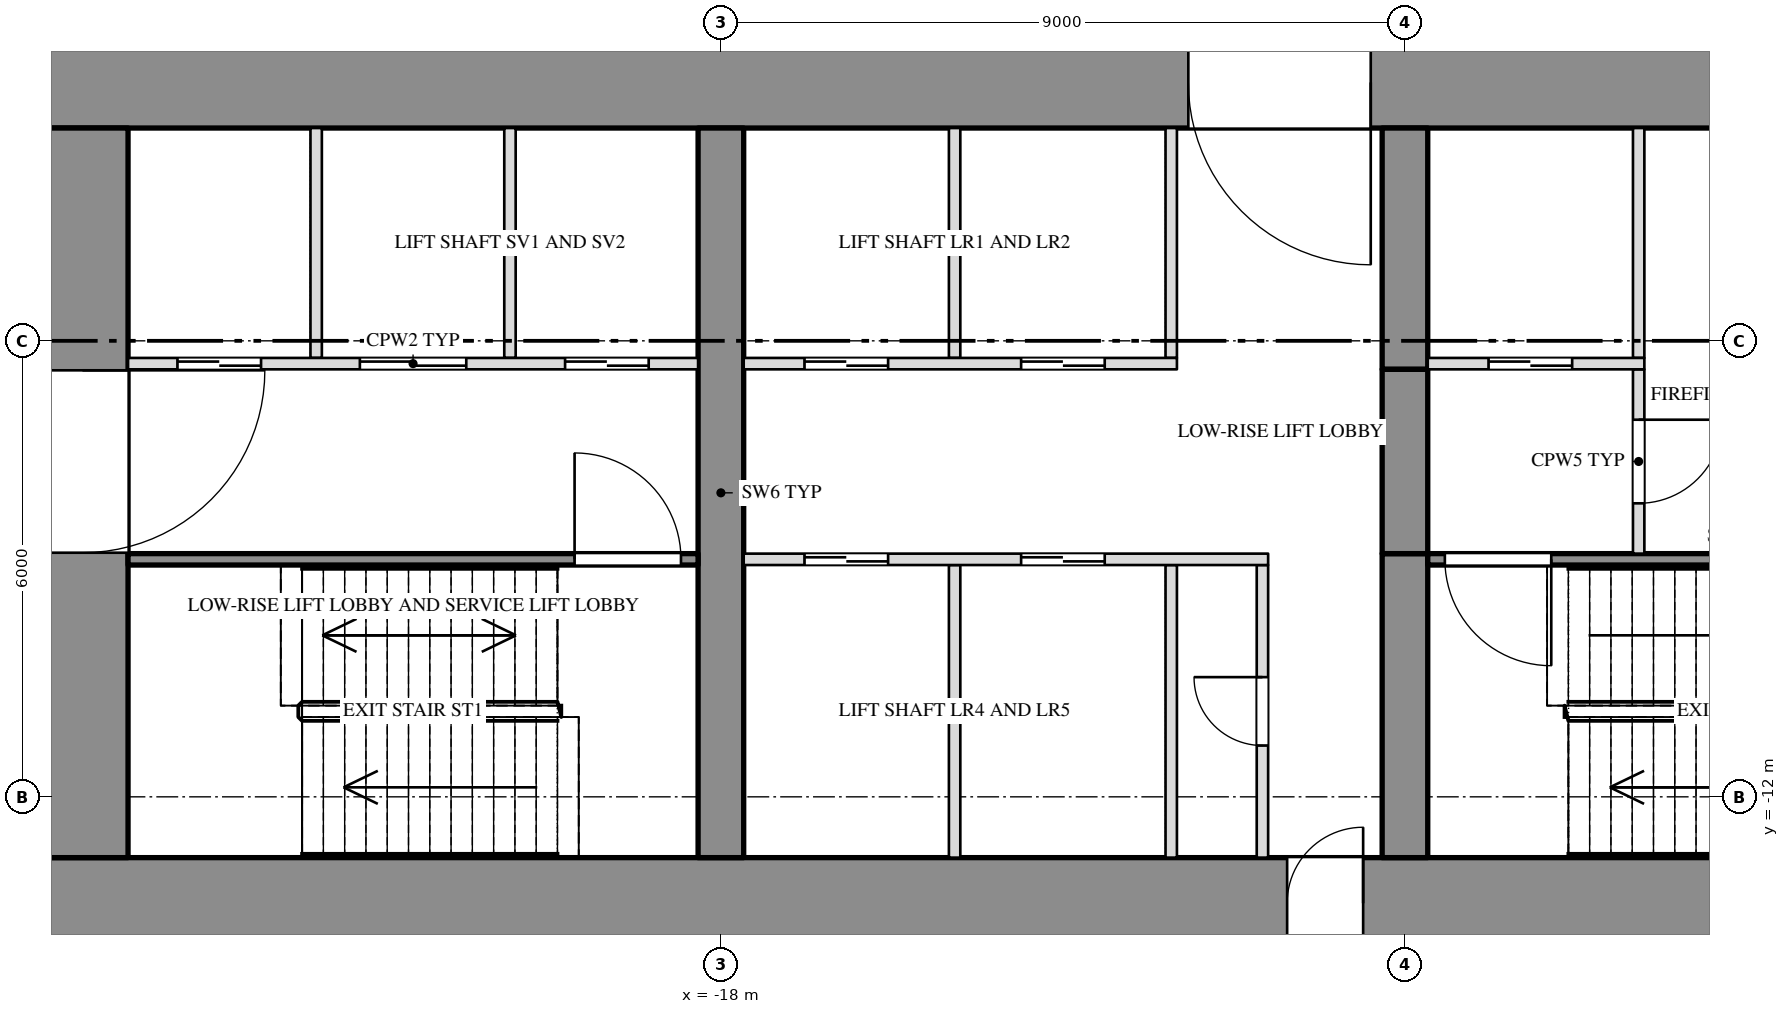
"""IFC4 building model, lengths in metres.
Left out: names, types, materials, properties, quantities, classifications, styles, units other than length and angle.
Written with IfcOpenShell. Run it as: python <this file> out.ifc"""

import sys

from ifc_helpers import new_model, si_unit, direction, frame, frame_2d, origin, place, context, subcontext, project, spatial, rectangle, extrude, element, fill, save


model = new_model("IFC4")
c1 = context("Model", 3, precision=1e-05, world=origin(), true_north=direction((0.0, 1.0)))
c2 = subcontext(c1, "Body", "Model", "MODEL_VIEW")
j1 = project(units=[si_unit("LENGTHUNIT", "METRE"), si_unit("PLANEANGLEUNIT", "RADIAN")], contexts=[c1])
p1 = place(None, origin())
s1 = spatial("IfcSite", under=j1, at=p1, CompositionType="ELEMENT")
p2 = place(p1, origin())
s2 = spatial("IfcBuilding", under=s1, at=p2, CompositionType="ELEMENT")
p3 = place(p2, frame((0.0, 0.0, 43.5)))
s3 = spatial("IfcBuildingStorey", under=s2, at=p3, CompositionType="ELEMENT", Elevation=43.5)
p4 = place(p3, frame((-27.0, -2.6, 0.0), z_axis=(0.0, 0.0, 1.0), x_axis=(1.0, 0.0, 0.0)))
e1 = element("IfcWall", 1, at=p4, inside=s3, PredefinedType="SHEAR", context=c2, shape_type="SweptSolid", body=[
    extrude(rectangle(XDim=54.0, YDim=1.2, at=frame_2d((27.0, 0.0))), origin(), (0.0, 0.0, 1.0), 4.25),
])
p5 = place(p4, frame((15.15, 0.0, 0.0)))
e2 = element("IfcOpeningElement", 2, at=p5, cuts=e1, PredefinedType="OPENING", context=c2, shape_type="SweptSolid", body=[
    extrude(rectangle(XDim=2.4, YDim=2.1, at=frame_2d((1.2, 1.05))), frame((0.0, 0.612, 0.0), z_axis=(0.0, -1.0, 0.0), x_axis=(1.0, 0.0, 0.0)), (0.0, 0.0, 1.0), 1.224),
])
p6 = place(p4, frame((36.45, 0.0, 0.0)))
e3 = element("IfcOpeningElement", 3, at=p6, cuts=e1, PredefinedType="OPENING", context=c2, shape_type="SweptSolid", body=[
    extrude(rectangle(XDim=2.4, YDim=2.1, at=frame_2d((1.2, 1.05))), frame((0.0, 0.612, 0.0), z_axis=(0.0, -1.0, 0.0), x_axis=(1.0, 0.0, 0.0)), (0.0, 0.0, 1.0), 1.224),
])
p7 = place(p3, frame((-27.0, -13.4, 0.0), z_axis=(0.0, 0.0, 1.0), x_axis=(1.0, 0.0, 0.0)))
e4 = element("IfcWall", 4, at=p7, inside=s3, PredefinedType="SHEAR", context=c2, shape_type="SweptSolid", body=[
    extrude(rectangle(XDim=54.0, YDim=1.2, at=frame_2d((27.0, 0.0))), origin(), (0.0, 0.0, 1.0), 4.25),
])
p8 = place(p7, frame((16.45, 0.0, 0.0)))
e5 = element("IfcOpeningElement", 5, at=p8, cuts=e4, PredefinedType="OPENING", context=c2, shape_type="SweptSolid", body=[
    extrude(rectangle(XDim=1.0, YDim=2.1, at=frame_2d((0.5, 1.05))), frame((0.0, 0.612, 0.0), z_axis=(0.0, -1.0, 0.0), x_axis=(1.0, 0.0, 0.0)), (0.0, 0.0, 1.0), 1.224),
])
p9 = place(p7, frame((36.55, 0.0, 0.0)))
e6 = element("IfcOpeningElement", 6, at=p9, cuts=e4, PredefinedType="OPENING", context=c2, shape_type="SweptSolid", body=[
    extrude(rectangle(XDim=1.0, YDim=2.1, at=frame_2d((0.5, 1.05))), frame((0.0, 0.612, 0.0), z_axis=(0.0, -1.0, 0.0), x_axis=(1.0, 0.0, 0.0)), (0.0, 0.0, 1.0), 1.224),
])
p10 = place(p3, frame((-26.4, -12.8, 0.0), z_axis=(0.0, 0.0, 1.0), x_axis=(0.0, 1.0, 0.0)))
e7 = element("IfcWall", 7, at=p10, inside=s3, PredefinedType="SHEAR", context=c2, shape_type="SweptSolid", body=[
    extrude(rectangle(XDim=9.6, YDim=1.2, at=frame_2d((4.8, 0.0))), origin(), (0.0, 0.0, 1.0), 4.25),
])
p11 = place(p10, frame((4.012, 0.0, 0.0)))
e8 = element("IfcOpeningElement", 8, at=p11, cuts=e7, PredefinedType="OPENING", context=c2, shape_type="SweptSolid", body=[
    extrude(rectangle(XDim=2.4, YDim=2.1, at=frame_2d((1.2, 1.05))), frame((0.0, 0.612, 0.0), z_axis=(0.0, -1.0, 0.0), x_axis=(1.0, 0.0, 0.0)), (0.0, 0.0, 1.0), 1.224),
])
p12 = place(p3, frame((-18.0, -12.8, 0.0), z_axis=(0.0, 0.0, 1.0), x_axis=(0.0, 1.0, 0.0)))
e9 = element("IfcWall", 9, at=p12, inside=s3, PredefinedType="SHEAR", context=c2, shape_type="SweptSolid", body=[
    extrude(rectangle(XDim=9.6, YDim=0.6, at=frame_2d((4.8, 0.0))), origin(), (0.0, 0.0, 1.0), 4.25),
])
p13 = place(p3, frame((-9.0, -12.8, 0.0), z_axis=(0.0, 0.0, 1.0), x_axis=(0.0, 1.0, 0.0)))
e10 = element("IfcWall", 10, at=p13, inside=s3, PredefinedType="SHEAR", context=c2, shape_type="SweptSolid", body=[
    extrude(rectangle(XDim=4.0, YDim=0.6, at=frame_2d((2.0, 0.0))), origin(), (0.0, 0.0, 1.0), 4.25),
])
p14 = place(p3, frame((-9.0, -6.375, 0.0), z_axis=(0.0, 0.0, 1.0), x_axis=(0.0, 1.0, 0.0)))
e11 = element("IfcWall", 11, at=p14, inside=s3, PredefinedType="SHEAR", context=c2, shape_type="SweptSolid", body=[
    extrude(rectangle(XDim=3.175, YDim=0.6, at=frame_2d((1.587, 0.0))), origin(), (0.0, 0.0, 1.0), 4.25),
])
p15 = place(p3, frame((-9.0, -8.8, 3.6), z_axis=(0.0, 0.0, 1.0), x_axis=(0.0, 1.0, 0.0)))
e12 = element("IfcWall", 12, at=p15, inside=s3, PredefinedType="SHEAR", context=c2, shape_type="SweptSolid", body=[
    extrude(rectangle(XDim=2.425, YDim=0.6, at=frame_2d((1.212, 0.0))), origin(), (0.0, 0.0, 1.0), 0.65),
])
for number, where, z_axis, x_axis in (
    (13, (-20.775, -6.225, 0.0), (0.0, 0.0, 1.0), (0.0, 1.0, 0.0)),
    (14, (-23.325, -6.225, 0.0), (0.0, 0.0, 1.0), (0.0, 1.0, 0.0)),
    (15, (-12.075, -6.225, 0.0), (0.0, 0.0, 1.0), (0.0, 1.0, 0.0)),
    (16, (-14.925, -6.225, 0.0), (0.0, 0.0, 1.0), (0.0, 1.0, 0.0)),
    (17, (-5.925, -6.225, 0.0), (0.0, 0.0, 1.0), (0.0, 1.0, 0.0)),
):
    element("IfcWall", number, at=place(p3, frame(where, z_axis=z_axis, x_axis=x_axis)), inside=s3, PredefinedType="PARTITIONING", context=c2, shape_type="SweptSolid", body=[
        extrude(rectangle(XDim=3.025, YDim=0.15, at=frame_2d((1.513, 0.0))), origin(), (0.0, 0.0, 1.0), 4.25),
    ])
p16 = place(p3, frame((-10.875, -12.8, 0.0), z_axis=(0.0, 0.0, 1.0), x_axis=(0.0, 1.0, 0.0)))
e18 = element("IfcWall", 18, at=p16, inside=s3, PredefinedType="PARTITIONING", context=c2, shape_type="SweptSolid", body=[
    extrude(rectangle(XDim=3.85, YDim=0.15, at=frame_2d((1.925, 0.0))), origin(), (0.0, 0.0, 1.0), 4.25),
])
p17 = place(p16, frame((1.475, 0.0, 0.0)))
e19 = element("IfcOpeningElement", 19, at=p17, cuts=e18, PredefinedType="OPENING", context=c2, shape_type="SweptSolid", body=[
    extrude(rectangle(XDim=0.9, YDim=2.1, at=frame_2d((0.45, 1.05))), frame((0.0, 0.087, 0.0), z_axis=(0.0, -1.0, 0.0), x_axis=(1.0, 0.0, 0.0)), (0.0, 0.0, 1.0), 0.174),
])
for number, where, z_axis, x_axis in (
    (20, (-12.075, -12.8, 0.0), (0.0, 0.0, 1.0), (0.0, 1.0, 0.0)),
    (21, (-14.925, -12.8, 0.0), (0.0, 0.0, 1.0), (0.0, 1.0, 0.0)),
):
    element("IfcWall", number, at=place(p3, frame(where, z_axis=z_axis, x_axis=x_axis)), inside=s3, PredefinedType="PARTITIONING", context=c2, shape_type="SweptSolid", body=[
        extrude(rectangle(XDim=3.85, YDim=0.15, at=frame_2d((1.925, 0.0))), origin(), (0.0, 0.0, 1.0), 4.25),
    ])
p18 = place(p3, frame((-5.925, -8.8, 0.0), z_axis=(0.0, 0.0, 1.0), x_axis=(0.0, 1.0, 0.0)))
e22 = element("IfcWall", 22, at=p18, inside=s3, PredefinedType="PARTITIONING", context=c2, shape_type="SweptSolid", body=[
    extrude(rectangle(XDim=2.425, YDim=0.15, at=frame_2d((1.212, 0.0))), origin(), (0.0, 0.0, 1.0), 4.25),
])
p19 = place(p18, frame((0.662, 0.0, 0.0)))
e23 = element("IfcOpeningElement", 23, at=p19, cuts=e22, PredefinedType="OPENING", context=c2, shape_type="SweptSolid", body=[
    extrude(rectangle(XDim=1.1, YDim=2.1, at=frame_2d((0.55, 1.05))), frame((0.0, 0.087, 0.0), z_axis=(0.0, -1.0, 0.0), x_axis=(1.0, 0.0, 0.0)), (0.0, 0.0, 1.0), 0.174),
])
p20 = place(p3, frame((-25.8, -6.3, 0.0), z_axis=(0.0, 0.0, 1.0), x_axis=(1.0, 0.0, 0.0)))
e24 = element("IfcWall", 24, at=p20, inside=s3, PredefinedType="PARTITIONING", context=c2, shape_type="SweptSolid", body=[
    extrude(rectangle(XDim=7.5, YDim=0.15, at=frame_2d((3.75, 0.0))), origin(), (0.0, 0.0, 1.0), 4.25),
])
p21 = place(p20, frame((0.65, 0.0, 0.0)))
e25 = element("IfcOpeningElement", 25, at=p21, cuts=e24, PredefinedType="OPENING", context=c2, shape_type="SweptSolid", body=[
    extrude(rectangle(XDim=1.1, YDim=2.1, at=frame_2d((0.55, 1.05))), frame((0.0, 0.087, 0.0), z_axis=(0.0, -1.0, 0.0), x_axis=(1.0, 0.0, 0.0)), (0.0, 0.0, 1.0), 0.174),
])
p22 = place(p20, frame((3.05, 0.0, 0.0)))
e26 = element("IfcOpeningElement", 26, at=p22, cuts=e24, PredefinedType="OPENING", context=c2, shape_type="SweptSolid", body=[
    extrude(rectangle(XDim=1.4, YDim=2.1, at=frame_2d((0.7, 1.05))), frame((0.0, 0.087, 0.0), z_axis=(0.0, -1.0, 0.0), x_axis=(1.0, 0.0, 0.0)), (0.0, 0.0, 1.0), 0.174),
])
p23 = place(p20, frame((5.75, 0.0, 0.0)))
e27 = element("IfcOpeningElement", 27, at=p23, cuts=e24, PredefinedType="OPENING", context=c2, shape_type="SweptSolid", body=[
    extrude(rectangle(XDim=1.1, YDim=2.1, at=frame_2d((0.55, 1.05))), frame((0.0, 0.087, 0.0), z_axis=(0.0, -1.0, 0.0), x_axis=(1.0, 0.0, 0.0)), (0.0, 0.0, 1.0), 0.174),
])
p24 = place(p3, frame((-17.7, -6.3, 0.0), z_axis=(0.0, 0.0, 1.0), x_axis=(1.0, 0.0, 0.0)))
e28 = element("IfcWall", 28, at=p24, inside=s3, PredefinedType="PARTITIONING", context=c2, shape_type="SweptSolid", body=[
    extrude(rectangle(XDim=5.7, YDim=0.15, at=frame_2d((2.85, 0.0))), origin(), (0.0, 0.0, 1.0), 4.25),
])
p25 = place(p24, frame((0.8, 0.0, 0.0)))
e29 = element("IfcOpeningElement", 29, at=p25, cuts=e28, PredefinedType="OPENING", context=c2, shape_type="SweptSolid", body=[
    extrude(rectangle(XDim=1.1, YDim=2.1, at=frame_2d((0.55, 1.05))), frame((0.0, 0.087, 0.0), z_axis=(0.0, -1.0, 0.0), x_axis=(1.0, 0.0, 0.0)), (0.0, 0.0, 1.0), 0.174),
])
p26 = place(p24, frame((3.65, 0.0, 0.0)))
e30 = element("IfcOpeningElement", 30, at=p26, cuts=e28, PredefinedType="OPENING", context=c2, shape_type="SweptSolid", body=[
    extrude(rectangle(XDim=1.1, YDim=2.1, at=frame_2d((0.55, 1.05))), frame((0.0, 0.087, 0.0), z_axis=(0.0, -1.0, 0.0), x_axis=(1.0, 0.0, 0.0)), (0.0, 0.0, 1.0), 0.174),
])
p27 = place(p3, frame((-8.7, -6.3, 0.0), z_axis=(0.0, 0.0, 1.0), x_axis=(1.0, 0.0, 0.0)))
e31 = element("IfcWall", 31, at=p27, inside=s3, PredefinedType="PARTITIONING", context=c2, shape_type="SweptSolid", body=[
    extrude(rectangle(XDim=2.85, YDim=0.15, at=frame_2d((1.425, 0.0))), origin(), (0.0, 0.0, 1.0), 4.25),
])
p28 = place(p27, frame((0.8, 0.0, 0.0)))
e32 = element("IfcOpeningElement", 32, at=p28, cuts=e31, PredefinedType="OPENING", context=c2, shape_type="SweptSolid", body=[
    extrude(rectangle(XDim=1.1, YDim=2.1, at=frame_2d((0.55, 1.05))), frame((0.0, 0.087, 0.0), z_axis=(0.0, -1.0, 0.0), x_axis=(1.0, 0.0, 0.0)), (0.0, 0.0, 1.0), 0.174),
])
p29 = place(p3, frame((-25.8, -8.875, 0.0), z_axis=(0.0, 0.0, 1.0), x_axis=(1.0, 0.0, 0.0)))
e33 = element("IfcWall", 33, at=p29, inside=s3, PredefinedType="SHEAR", context=c2, shape_type="SweptSolid", body=[
    extrude(rectangle(XDim=7.5, YDim=0.15, at=frame_2d((3.75, 0.0))), origin(), (0.0, 0.0, 1.0), 4.25),
])
p30 = place(p29, frame((5.875, 0.0, 0.0)))
e34 = element("IfcOpeningElement", 34, at=p30, cuts=e33, PredefinedType="OPENING", context=c2, shape_type="SweptSolid", body=[
    extrude(rectangle(XDim=1.4, YDim=2.1, at=frame_2d((0.7, 1.05))), frame((0.0, 0.087, 0.0), z_axis=(0.0, -1.0, 0.0), x_axis=(1.0, 0.0, 0.0)), (0.0, 0.0, 1.0), 0.174),
])
p31 = place(p3, frame((-17.7, -8.875, 0.0), z_axis=(0.0, 0.0, 1.0), x_axis=(1.0, 0.0, 0.0)))
e35 = element("IfcWall", 35, at=p31, inside=s3, PredefinedType="PARTITIONING", context=c2, shape_type="SweptSolid", body=[
    extrude(rectangle(XDim=6.9, YDim=0.15, at=frame_2d((3.45, 0.0))), origin(), (0.0, 0.0, 1.0), 4.25),
])
p32 = place(p31, frame((0.8, 0.0, 0.0)))
e36 = element("IfcOpeningElement", 36, at=p32, cuts=e35, PredefinedType="OPENING", context=c2, shape_type="SweptSolid", body=[
    extrude(rectangle(XDim=1.1, YDim=2.1, at=frame_2d((0.55, 1.05))), frame((0.0, 0.087, 0.0), z_axis=(0.0, -1.0, 0.0), x_axis=(1.0, 0.0, 0.0)), (0.0, 0.0, 1.0), 0.174),
])
p33 = place(p31, frame((3.65, 0.0, 0.0)))
e37 = element("IfcOpeningElement", 37, at=p33, cuts=e35, PredefinedType="OPENING", context=c2, shape_type="SweptSolid", body=[
    extrude(rectangle(XDim=1.1, YDim=2.1, at=frame_2d((0.55, 1.05))), frame((0.0, 0.087, 0.0), z_axis=(0.0, -1.0, 0.0), x_axis=(1.0, 0.0, 0.0)), (0.0, 0.0, 1.0), 0.174),
])
p34 = place(p3, frame((-8.7, -8.875, 0.0), z_axis=(0.0, 0.0, 1.0), x_axis=(1.0, 0.0, 0.0)))
e38 = element("IfcWall", 38, at=p34, inside=s3, PredefinedType="SHEAR", context=c2, shape_type="SweptSolid", body=[
    extrude(rectangle(XDim=8.4, YDim=0.15, at=frame_2d((4.2, 0.0))), origin(), (0.0, 0.0, 1.0), 4.25),
])
p35 = place(p34, frame((0.225, 0.0, 0.0)))
e39 = element("IfcOpeningElement", 39, at=p35, cuts=e38, PredefinedType="OPENING", context=c2, shape_type="SweptSolid", body=[
    extrude(rectangle(XDim=1.4, YDim=2.1, at=frame_2d((0.7, 1.05))), frame((0.0, 0.087, 0.0), z_axis=(0.0, -1.0, 0.0), x_axis=(1.0, 0.0, 0.0)), (0.0, 0.0, 1.0), 0.174),
])
p36 = place(p11, origin())
e40 = element("IfcDoor", 40, at=p36, inside=s3, OperationType="DOUBLE_DOOR_SINGLE_SWING", PredefinedType="DOOR", context=c2, shape_type="SweptSolid", body=[
    extrude(rectangle(XDim=2.4, YDim=2.1, at=frame_2d((1.2, 1.05))), frame((0.0, 0.025, 0.0), z_axis=(0.0, -1.0, 0.0), x_axis=(1.0, 0.0, 0.0)), (0.0, 0.0, 1.0), 0.05),
])
fill(e8, e40)
p37 = place(p21, origin())
e41 = element("IfcDoor", 41, at=p37, inside=s3, OperationType="SLIDING_TO_RIGHT", PredefinedType="DOOR", context=c2, shape_type="SweptSolid", body=[
    extrude(rectangle(XDim=1.1, YDim=2.1, at=frame_2d((0.55, 1.05))), frame((0.0, 0.025, 0.0), z_axis=(0.0, -1.0, 0.0), x_axis=(1.0, 0.0, 0.0)), (0.0, 0.0, 1.0), 0.05),
])
fill(e25, e41)
p38 = place(p22, origin())
e42 = element("IfcDoor", 42, at=p38, inside=s3, OperationType="SLIDING_TO_LEFT", PredefinedType="DOOR", context=c2, shape_type="SweptSolid", body=[
    extrude(rectangle(XDim=1.4, YDim=2.1, at=frame_2d((0.7, 1.05))), frame((0.0, 0.025, 0.0), z_axis=(0.0, -1.0, 0.0), x_axis=(1.0, 0.0, 0.0)), (0.0, 0.0, 1.0), 0.05),
])
fill(e26, e42)
p39 = place(p23, origin())
e43 = element("IfcDoor", 43, at=p39, inside=s3, OperationType="SLIDING_TO_RIGHT", PredefinedType="DOOR", context=c2, shape_type="SweptSolid", body=[
    extrude(rectangle(XDim=1.1, YDim=2.1, at=frame_2d((0.55, 1.05))), frame((0.0, 0.025, 0.0), z_axis=(0.0, -1.0, 0.0), x_axis=(1.0, 0.0, 0.0)), (0.0, 0.0, 1.0), 0.05),
])
fill(e27, e43)
p40 = place(p30, origin())
e44 = element("IfcDoor", 44, at=p40, inside=s3, OperationType="DOUBLE_DOOR_SINGLE_SWING", PredefinedType="DOOR", context=c2, shape_type="SweptSolid", body=[
    extrude(rectangle(XDim=1.4, YDim=2.1, at=frame_2d((0.7, 1.05))), frame((0.0, 0.025, 0.0), z_axis=(0.0, -1.0, 0.0), x_axis=(1.0, 0.0, 0.0)), (0.0, 0.0, 1.0), 0.05),
])
fill(e34, e44)
p41 = place(p32, origin())
e45 = element("IfcDoor", 45, at=p41, inside=s3, OperationType="SLIDING_TO_RIGHT", PredefinedType="DOOR", context=c2, shape_type="SweptSolid", body=[
    extrude(rectangle(XDim=1.1, YDim=2.1, at=frame_2d((0.55, 1.05))), frame((0.0, 0.025, 0.0), z_axis=(0.0, -1.0, 0.0), x_axis=(1.0, 0.0, 0.0)), (0.0, 0.0, 1.0), 0.05),
])
fill(e36, e45)
p42 = place(p25, origin())
e46 = element("IfcDoor", 46, at=p42, inside=s3, OperationType="SLIDING_TO_LEFT", PredefinedType="DOOR", context=c2, shape_type="SweptSolid", body=[
    extrude(rectangle(XDim=1.1, YDim=2.1, at=frame_2d((0.55, 1.05))), frame((0.0, 0.025, 0.0), z_axis=(0.0, -1.0, 0.0), x_axis=(1.0, 0.0, 0.0)), (0.0, 0.0, 1.0), 0.05),
])
fill(e29, e46)
p43 = place(p33, origin())
e47 = element("IfcDoor", 47, at=p43, inside=s3, OperationType="SLIDING_TO_RIGHT", PredefinedType="DOOR", context=c2, shape_type="SweptSolid", body=[
    extrude(rectangle(XDim=1.1, YDim=2.1, at=frame_2d((0.55, 1.05))), frame((0.0, 0.025, 0.0), z_axis=(0.0, -1.0, 0.0), x_axis=(1.0, 0.0, 0.0)), (0.0, 0.0, 1.0), 0.05),
])
fill(e37, e47)
p44 = place(p26, origin())
e48 = element("IfcDoor", 48, at=p44, inside=s3, OperationType="SLIDING_TO_LEFT", PredefinedType="DOOR", context=c2, shape_type="SweptSolid", body=[
    extrude(rectangle(XDim=1.1, YDim=2.1, at=frame_2d((0.55, 1.05))), frame((0.0, 0.025, 0.0), z_axis=(0.0, -1.0, 0.0), x_axis=(1.0, 0.0, 0.0)), (0.0, 0.0, 1.0), 0.05),
])
fill(e30, e48)
p45 = place(p17, origin())
e49 = element("IfcDoor", 49, at=p45, inside=s3, OperationType="SINGLE_SWING_RIGHT", PredefinedType="DOOR", context=c2, shape_type="SweptSolid", body=[
    extrude(rectangle(XDim=0.9, YDim=2.1, at=frame_2d((0.45, 1.05))), frame((0.0, 0.025, 0.0), z_axis=(0.0, -1.0, 0.0), x_axis=(1.0, 0.0, 0.0)), (0.0, 0.0, 1.0), 0.05),
])
fill(e19, e49)
p46 = place(p5, origin())
e50 = element("IfcDoor", 50, at=p46, inside=s3, OperationType="DOUBLE_DOOR_SINGLE_SWING", PredefinedType="DOOR", context=c2, shape_type="SweptSolid", body=[
    extrude(rectangle(XDim=2.4, YDim=2.1, at=frame_2d((1.2, 1.05))), frame((0.0, 0.025, 0.0), z_axis=(0.0, -1.0, 0.0), x_axis=(1.0, 0.0, 0.0)), (0.0, 0.0, 1.0), 0.05),
])
fill(e2, e50)
p47 = place(p8, origin())
e51 = element("IfcDoor", 51, at=p47, inside=s3, OperationType="SINGLE_SWING_RIGHT", PredefinedType="DOOR", context=c2, shape_type="SweptSolid", body=[
    extrude(rectangle(XDim=1.0, YDim=2.1, at=frame_2d((0.5, 1.05))), frame((0.0, 0.025, 0.0), z_axis=(0.0, -1.0, 0.0), x_axis=(1.0, 0.0, 0.0)), (0.0, 0.0, 1.0), 0.05),
])
fill(e5, e51)
p48 = place(p35, origin())
e52 = element("IfcDoor", 52, at=p48, inside=s3, OperationType="DOUBLE_DOOR_SINGLE_SWING", PredefinedType="DOOR", context=c2, shape_type="SweptSolid", body=[
    extrude(rectangle(XDim=1.4, YDim=2.1, at=frame_2d((0.7, 1.05))), frame((0.0, 0.025, 0.0), z_axis=(0.0, -1.0, 0.0), x_axis=(1.0, 0.0, 0.0)), (0.0, 0.0, 1.0), 0.05),
])
fill(e39, e52)
p49 = place(p28, origin())
e53 = element("IfcDoor", 53, at=p49, inside=s3, OperationType="SLIDING_TO_RIGHT", PredefinedType="DOOR", context=c2, shape_type="SweptSolid", body=[
    extrude(rectangle(XDim=1.1, YDim=2.1, at=frame_2d((0.55, 1.05))), frame((0.0, 0.025, 0.0), z_axis=(0.0, -1.0, 0.0), x_axis=(1.0, 0.0, 0.0)), (0.0, 0.0, 1.0), 0.05),
])
fill(e32, e53)
p50 = place(p19, origin())
e54 = element("IfcDoor", 54, at=p50, inside=s3, OperationType="SINGLE_SWING_LEFT", PredefinedType="DOOR", context=c2, shape_type="SweptSolid", body=[
    extrude(rectangle(XDim=1.1, YDim=2.1, at=frame_2d((0.55, 1.05))), frame((0.0, 0.025, 0.0), z_axis=(0.0, -1.0, 0.0), x_axis=(1.0, 0.0, 0.0)), (0.0, 0.0, 1.0), 0.05),
])
fill(e23, e54)
save(model, sys.argv[1])
